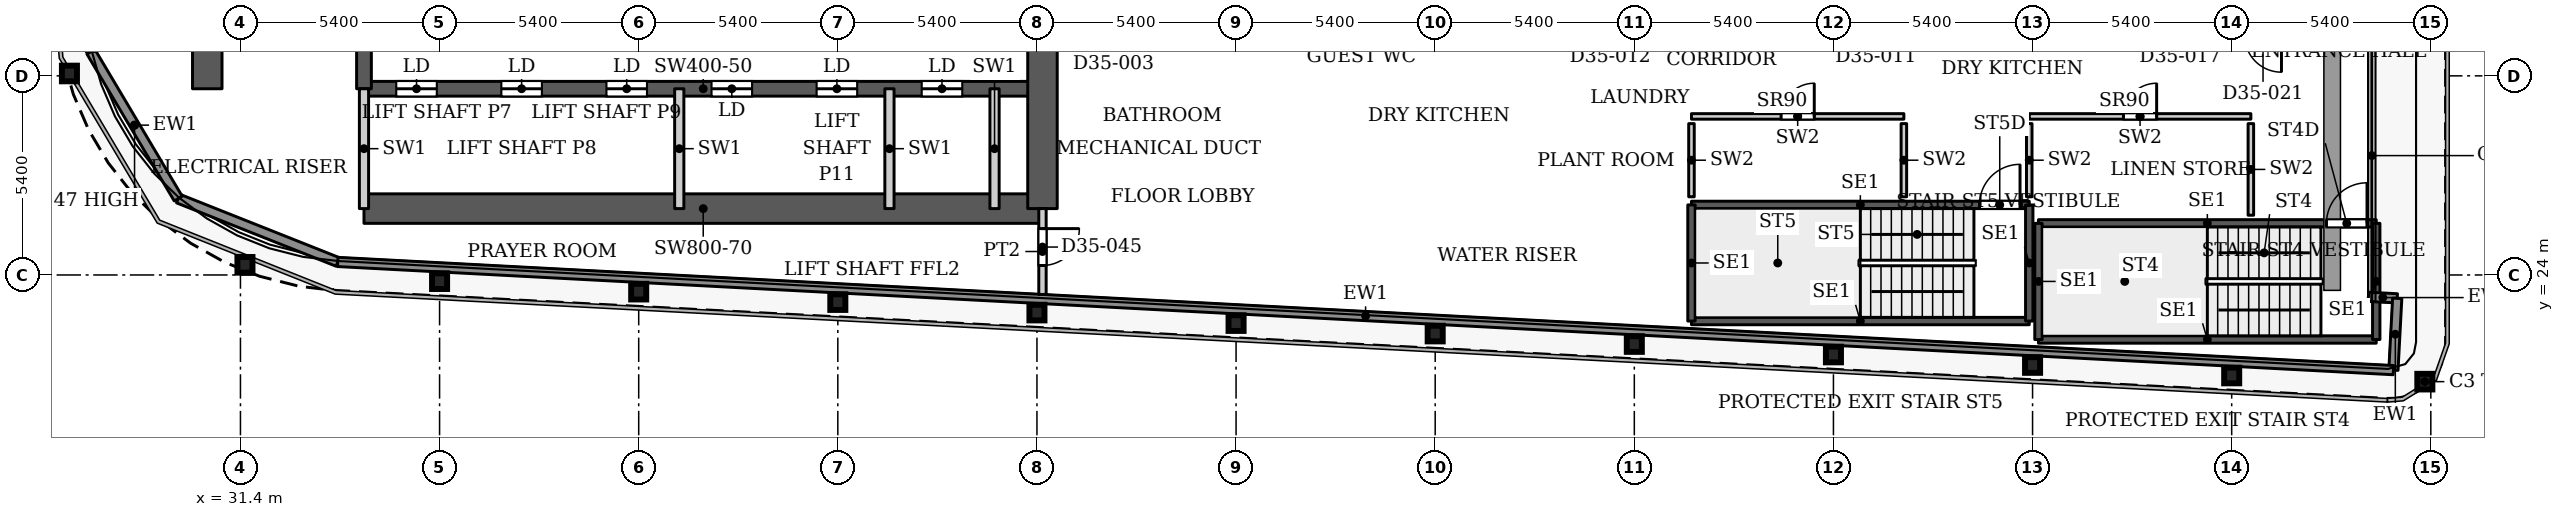
"""IFC4 building model, lengths in metres.
Left out: names, types, materials, properties, quantities, classifications, styles, units other than length and angle.
Written with IfcOpenShell. Run it as: python <this file> out.ifc"""

import sys

from ifc_helpers import new_model, si_unit, direction, frame, frame_2d, origin, origin_2d, place, context, subcontext, project, spatial, rectangle, i_section, extrude, source, transform, mapped, element, fill, save


model = new_model("IFC4")
c1 = context("Model", 3, precision=1e-05, world=origin(), true_north=direction((0.0, 1.0)))
c2 = subcontext(c1, "Body", "Model", "MODEL_VIEW")
j1 = project(units=[si_unit("LENGTHUNIT", "METRE"), si_unit("PLANEANGLEUNIT", "RADIAN")], contexts=[c1])
p1 = place(None, origin())
s1 = spatial("IfcSite", under=j1, at=p1, CompositionType="ELEMENT")
p2 = place(p1, origin())
s2 = spatial("IfcBuilding", under=s1, at=p2, CompositionType="ELEMENT")
p3 = place(p2, frame((0.0, 0.0, 156.5)))
s3 = spatial("IfcBuildingStorey", under=s2, at=p3, CompositionType="ELEMENT", Elevation=156.5)
for number, where, z_axis, x_axis in (
    (1, (90.638, 21.107, 0.0), (0.0, 0.0, 1.0), (1.0, 0.0, 0.0)),
    (2, (85.4, 21.274, 0.0), (0.0, 0.0, 1.0), (1.0, 0.0, 0.0)),
    (3, (80.0, 21.558, 0.0), (0.0, 0.0, 1.0), (1.0, 0.0, 0.0)),
    (4, (74.6, 21.843, 0.0), (0.0, 0.0, 1.0), (1.0, 0.0, 0.0)),
    (5, (69.2, 22.127, 0.0), (0.0, 0.0, 1.0), (1.0, 0.0, 0.0)),
    (6, (63.8, 22.411, 0.0), (0.0, 0.0, 1.0), (1.0, 0.0, 0.0)),
    (7, (58.4, 22.695, 0.0), (0.0, 0.0, 1.0), (1.0, 0.0, 0.0)),
    (8, (53.0, 22.98, 0.0), (0.0, 0.0, 1.0), (1.0, 0.0, 0.0)),
    (9, (47.6, 23.264, 0.0), (0.0, 0.0, 1.0), (1.0, 0.0, 0.0)),
    (10, (42.2, 23.548, 0.0), (0.0, 0.0, 1.0), (1.0, 0.0, 0.0)),
    (11, (36.8, 23.832, 0.0), (0.0, 0.0, 1.0), (1.0, 0.0, 0.0)),
    (12, (31.522, 24.275, 0.0), (0.0, 0.0, 1.0), (1.0, 0.0, 0.0)),
    (13, (26.762, 29.464, 0.0), (0.0, 0.0, 1.0), (1.0, 0.0, 0.0)),
):
    element("IfcColumn", number, at=place(p3, frame(where, z_axis=z_axis, x_axis=x_axis)), inside=s3, PredefinedType="COLUMN", context=c2, shape_type="SweptSolid", body=[
        extrude(i_section(OverallWidth=0.409, OverallDepth=0.425, WebThickness=0.033, FlangeThickness=0.052, FilletRadius=0.013, at=origin_2d()), origin(), (0.0, 0.0, 1.0), 3.9),
    ])
p4 = place(p3, frame((34.75, 25.8, 0.0), z_axis=(0.0, 0.0, 1.0), x_axis=(1.0, 0.0, 0.0)))
e14 = element("IfcWall", 14, at=p4, inside=s3, PredefinedType="SHEAR", context=c2, shape_type="SweptSolid", body=[
    extrude(rectangle(XDim=18.4, YDim=0.8, at=frame_2d((9.2, 0.0))), origin(), (0.0, 0.0, 1.0), 3.9),
])
p5 = place(p3, frame((34.75, 29.05, 0.0), z_axis=(0.0, 0.0, 1.0), x_axis=(1.0, 0.0, 0.0)))
e15 = element("IfcWall", 15, at=p5, inside=s3, PredefinedType="SHEAR", context=c2, shape_type="SweptSolid", body=[
    extrude(rectangle(XDim=18.4, YDim=0.4, at=frame_2d((9.2, 0.0))), origin(), (0.0, 0.0, 1.0), 3.9),
])
p6 = place(p5, frame((0.875, 0.0, 0.0)))
e16 = element("IfcOpeningElement", 16, at=p6, cuts=e15, PredefinedType="OPENING", context=c2, shape_type="SweptSolid", body=[
    extrude(rectangle(XDim=1.1, YDim=2.2, at=frame_2d((0.55, 1.1))), frame((0.0, 0.21, 0.0), z_axis=(0.0, -1.0, 0.0), x_axis=(1.0, 0.0, 0.0)), (0.0, 0.0, 1.0), 0.42),
])
p7 = place(p5, frame((3.725, 0.0, 0.0)))
e17 = element("IfcOpeningElement", 17, at=p7, cuts=e15, PredefinedType="OPENING", context=c2, shape_type="SweptSolid", body=[
    extrude(rectangle(XDim=1.1, YDim=2.2, at=frame_2d((0.55, 1.1))), frame((0.0, 0.21, 0.0), z_axis=(0.0, -1.0, 0.0), x_axis=(1.0, 0.0, 0.0)), (0.0, 0.0, 1.0), 0.42),
])
p8 = place(p5, frame((6.575, 0.0, 0.0)))
e18 = element("IfcOpeningElement", 18, at=p8, cuts=e15, PredefinedType="OPENING", context=c2, shape_type="SweptSolid", body=[
    extrude(rectangle(XDim=1.1, YDim=2.2, at=frame_2d((0.55, 1.1))), frame((0.0, 0.21, 0.0), z_axis=(0.0, -1.0, 0.0), x_axis=(1.0, 0.0, 0.0)), (0.0, 0.0, 1.0), 0.42),
])
p9 = place(p5, frame((9.425, 0.0, 0.0)))
e19 = element("IfcOpeningElement", 19, at=p9, cuts=e15, PredefinedType="OPENING", context=c2, shape_type="SweptSolid", body=[
    extrude(rectangle(XDim=1.1, YDim=2.2, at=frame_2d((0.55, 1.1))), frame((0.0, 0.21, 0.0), z_axis=(0.0, -1.0, 0.0), x_axis=(1.0, 0.0, 0.0)), (0.0, 0.0, 1.0), 0.42),
])
p10 = place(p5, frame((12.275, 0.0, 0.0)))
e20 = element("IfcOpeningElement", 20, at=p10, cuts=e15, PredefinedType="OPENING", context=c2, shape_type="SweptSolid", body=[
    extrude(rectangle(XDim=1.1, YDim=2.2, at=frame_2d((0.55, 1.1))), frame((0.0, 0.21, 0.0), z_axis=(0.0, -1.0, 0.0), x_axis=(1.0, 0.0, 0.0)), (0.0, 0.0, 1.0), 0.42),
])
p11 = place(p5, frame((15.125, 0.0, 0.0)))
e21 = element("IfcOpeningElement", 21, at=p11, cuts=e15, PredefinedType="OPENING", context=c2, shape_type="SweptSolid", body=[
    extrude(rectangle(XDim=1.1, YDim=2.2, at=frame_2d((0.55, 1.1))), frame((0.0, 0.21, 0.0), z_axis=(0.0, -1.0, 0.0), x_axis=(1.0, 0.0, 0.0)), (0.0, 0.0, 1.0), 0.42),
])
p12 = place(p3, frame((34.75, 29.05, 0.0), z_axis=(0.0, 0.0, 1.0), x_axis=(0.0, 1.0, 0.0)))
e22 = element("IfcWall", 22, at=p12, inside=s3, PredefinedType="SHEAR", context=c2, shape_type="SweptSolid", body=[
    extrude(rectangle(XDim=18.45, YDim=0.4, at=frame_2d((9.225, 0.0))), origin(), (0.0, 0.0, 1.0), 3.9),
])
p13 = place(p12, frame((8.025, 0.0, 0.0)))
e23 = element("IfcOpeningElement", 23, at=p13, cuts=e22, PredefinedType="OPENING", context=c2, shape_type="SweptSolid", body=[
    extrude(rectangle(XDim=1.1, YDim=2.2, at=frame_2d((0.55, 1.1))), frame((0.0, 0.21, 0.0), z_axis=(0.0, -1.0, 0.0), x_axis=(1.0, 0.0, 0.0)), (0.0, 0.0, 1.0), 0.42),
])
p14 = place(p12, frame((10.875, 0.0, 0.0)))
e24 = element("IfcOpeningElement", 24, at=p14, cuts=e22, PredefinedType="OPENING", context=c2, shape_type="SweptSolid", body=[
    extrude(rectangle(XDim=1.1, YDim=2.2, at=frame_2d((0.55, 1.1))), frame((0.0, 0.21, 0.0), z_axis=(0.0, -1.0, 0.0), x_axis=(1.0, 0.0, 0.0)), (0.0, 0.0, 1.0), 0.42),
])
p15 = place(p12, frame((13.725, 0.0, 0.0)))
e25 = element("IfcOpeningElement", 25, at=p15, cuts=e22, PredefinedType="OPENING", context=c2, shape_type="SweptSolid", body=[
    extrude(rectangle(XDim=1.1, YDim=2.2, at=frame_2d((0.55, 1.1))), frame((0.0, 0.21, 0.0), z_axis=(0.0, -1.0, 0.0), x_axis=(1.0, 0.0, 0.0)), (0.0, 0.0, 1.0), 0.42),
])
p16 = place(p12, frame((15.95, 0.0, 0.0)))
e26 = element("IfcOpeningElement", 26, at=p16, cuts=e22, PredefinedType="OPENING", context=c2, shape_type="SweptSolid", body=[
    extrude(rectangle(XDim=1.1, YDim=2.2, at=frame_2d((0.55, 1.1))), frame((0.0, 0.21, 0.0), z_axis=(0.0, -1.0, 0.0), x_axis=(1.0, 0.0, 0.0)), (0.0, 0.0, 1.0), 0.42),
])
p17 = place(p3, frame((30.5, 29.05, 0.0), z_axis=(0.0, 0.0, 1.0), x_axis=(0.0, 1.0, 0.0)))
e27 = element("IfcWall", 27, at=p17, inside=s3, PredefinedType="SHEAR", context=c2, shape_type="SweptSolid", body=[
    extrude(rectangle(XDim=18.45, YDim=0.8, at=frame_2d((9.225, 0.0))), origin(), (0.0, 0.0, 1.0), 3.9),
])
p18 = place(p17, frame((6.55, 0.0, 0.0)))
e28 = element("IfcOpeningElement", 28, at=p18, cuts=e27, PredefinedType="OPENING", context=c2, shape_type="SweptSolid", body=[
    extrude(rectangle(XDim=0.9, YDim=2.2, at=frame_2d((0.45, 1.1))), frame((0.0, 0.41, 0.0), z_axis=(0.0, -1.0, 0.0), x_axis=(1.0, 0.0, 0.0)), (0.0, 0.0, 1.0), 0.82),
])
p19 = place(p17, frame((11.025, 0.0, 0.0)))
e29 = element("IfcOpeningElement", 29, at=p19, cuts=e27, PredefinedType="OPENING", context=c2, shape_type="SweptSolid", body=[
    extrude(rectangle(XDim=0.9, YDim=2.2, at=frame_2d((0.45, 1.1))), frame((0.0, 0.41, 0.0), z_axis=(0.0, -1.0, 0.0), x_axis=(1.0, 0.0, 0.0)), (0.0, 0.0, 1.0), 0.82),
])
p20 = place(p3, frame((53.15, 25.8, 0.0), z_axis=(0.0, 0.0, 1.0), x_axis=(0.0, 1.0, 0.0)))
e30 = element("IfcWall", 30, at=p20, inside=s3, PredefinedType="SHEAR", context=c2, shape_type="SweptSolid", body=[
    extrude(rectangle(XDim=10.4, YDim=0.8, at=frame_2d((5.2, 0.0))), origin(), (0.0, 0.0, 1.0), 3.9),
])
p21 = place(p3, frame((34.039, 24.353, 0.0), z_axis=(0.0, 0.0, 1.0), x_axis=(-0.929352825399, 0.369192803184, 0.0)))
e31 = element("IfcWall", 31, at=p21, inside=s3, PredefinedType="SOLIDWALL", context=c2, shape_type="SweptSolid", body=[
    extrude(rectangle(XDim=4.656, YDim=0.25, at=frame_2d((2.328, 0.0))), origin(), (0.0, 0.0, 1.0), 3.75),
])
p22 = place(p3, frame((29.712, 26.072, 0.0), z_axis=(0.0, 0.0, 1.0), x_axis=(-0.511028049012, 0.859564036662, 0.0)))
e32 = element("IfcWall", 32, at=p22, inside=s3, PredefinedType="SOLIDWALL", context=c2, shape_type="SweptSolid", body=[
    extrude(rectangle(XDim=4.634, YDim=0.25, at=frame_2d((2.317, 0.0))), origin(), (0.0, 0.0, 1.0), 3.147),
])
p23 = place(p3, frame((27.344, 30.055, 0.0), z_axis=(0.0, 0.0, 1.0), x_axis=(-0.077571675317, 0.99698677784, 0.0)))
e33 = element("IfcWall", 33, at=p23, inside=s3, PredefinedType="SOLIDWALL", context=c2, shape_type="SweptSolid", body=[
    extrude(rectangle(XDim=1.92, YDim=0.25, at=frame_2d((0.96, 0.0))), origin(), (0.0, 0.0, 1.0), 3.75),
])
p24 = place(p3, frame((89.107, 23.408, 0.0), z_axis=(0.0, 0.0, 1.0), x_axis=(0.998561284263, -0.053622398031, 0.0)))
e34 = element("IfcWall", 34, at=p24, inside=s3, PredefinedType="SOLIDWALL", context=c2, shape_type="SweptSolid", body=[
    extrude(rectangle(XDim=0.783, YDim=0.25, at=frame_2d((0.392, 0.0))), origin(), (0.0, 0.0, 1.0), 3.75),
])
p25 = place(p3, frame((89.889, 23.366, 0.0), z_axis=(0.0, 0.0, 1.0), x_axis=(-0.052841433274, -0.998602915542, 0.0)))
e35 = element("IfcWall", 35, at=p25, inside=s3, PredefinedType="SOLIDWALL", context=c2, shape_type="SweptSolid", body=[
    extrude(rectangle(XDim=1.95, YDim=0.25, at=frame_2d((0.975, 0.0))), origin(), (0.0, 0.0, 1.0), 3.75),
])
p26 = place(p3, frame((89.786, 21.419, 0.0), z_axis=(0.0, 0.0, 1.0), x_axis=(-0.998617793089, 0.052559521752, 0.0)))
e36 = element("IfcWall", 36, at=p26, inside=s3, PredefinedType="SOLIDWALL", context=c2, shape_type="SweptSolid", body=[
    extrude(rectangle(XDim=55.824, YDim=0.25, at=frame_2d((27.912, 0.0))), origin(), (0.0, 0.0, 1.0), 3.75),
])
p27 = place(p3, frame((80.16, 22.25, 0.0), z_axis=(0.0, 0.0, 1.0), x_axis=(1.0, 0.0, 0.0)))
e37 = element("IfcWall", 37, at=p27, inside=s3, PredefinedType="SHEAR", context=c2, shape_type="SweptSolid", body=[
    extrude(rectangle(XDim=9.16, YDim=0.2, at=frame_2d((4.58, 0.0))), origin(), (0.0, 0.0, 1.0), 3.9),
])
p28 = place(p3, frame((80.16, 25.4, 0.0), z_axis=(0.0, 0.0, 1.0), x_axis=(1.0, 0.0, 0.0)))
e38 = element("IfcWall", 38, at=p28, inside=s3, PredefinedType="SHEAR", context=c2, shape_type="SweptSolid", body=[
    extrude(rectangle(XDim=9.16, YDim=0.2, at=frame_2d((4.58, 0.0))), origin(), (0.0, 0.0, 1.0), 3.9),
])
p29 = place(p28, frame((7.81, 0.0, 0.0)))
e39 = element("IfcOpeningElement", 39, at=p29, cuts=e38, PredefinedType="OPENING", context=c2, shape_type="SweptSolid", body=[
    extrude(rectangle(XDim=1.1, YDim=2.2, at=frame_2d((0.55, 1.1))), frame((0.0, 0.11, 0.0), z_axis=(0.0, -1.0, 0.0), x_axis=(1.0, 0.0, 0.0)), (0.0, 0.0, 1.0), 0.22),
])
for number, where, z_axis, x_axis in (
    (40, (80.16, 22.25, 0.0), (0.0, 0.0, 1.0), (0.0, 1.0, 0.0)),
    (41, (89.32, 22.25, 0.0), (0.0, 0.0, 1.0), (0.0, 1.0, 0.0)),
):
    element("IfcWall", number, at=place(p3, frame(where, z_axis=z_axis, x_axis=x_axis)), inside=s3, PredefinedType="SHEAR", context=c2, shape_type="SweptSolid", body=[
        extrude(rectangle(XDim=3.15, YDim=0.2, at=frame_2d((1.575, 0.0))), origin(), (0.0, 0.0, 1.0), 3.9),
    ])
p30 = place(p3, frame((70.75, 22.75, 0.0), z_axis=(0.0, 0.0, 1.0), x_axis=(1.0, 0.0, 0.0)))
e42 = element("IfcWall", 42, at=p30, inside=s3, PredefinedType="SHEAR", context=c2, shape_type="SweptSolid", body=[
    extrude(rectangle(XDim=9.16, YDim=0.2, at=frame_2d((4.58, 0.0))), origin(), (0.0, 0.0, 1.0), 3.9),
])
p31 = place(p3, frame((70.75, 25.9, 0.0), z_axis=(0.0, 0.0, 1.0), x_axis=(1.0, 0.0, 0.0)))
e43 = element("IfcWall", 43, at=p31, inside=s3, PredefinedType="SHEAR", context=c2, shape_type="SweptSolid", body=[
    extrude(rectangle(XDim=9.16, YDim=0.2, at=frame_2d((4.58, 0.0))), origin(), (0.0, 0.0, 1.0), 3.9),
])
p32 = place(p31, frame((7.81, 0.0, 0.0)))
e44 = element("IfcOpeningElement", 44, at=p32, cuts=e43, PredefinedType="OPENING", context=c2, shape_type="SweptSolid", body=[
    extrude(rectangle(XDim=1.1, YDim=2.2, at=frame_2d((0.55, 1.1))), frame((0.0, 0.11, 0.0), z_axis=(0.0, -1.0, 0.0), x_axis=(1.0, 0.0, 0.0)), (0.0, 0.0, 1.0), 0.22),
])
for number, where, z_axis, x_axis in (
    (45, (70.75, 22.75, 0.0), (0.0, 0.0, 1.0), (0.0, 1.0, 0.0)),
    (46, (79.91, 22.75, 0.0), (0.0, 0.0, 1.0), (0.0, 1.0, 0.0)),
):
    element("IfcWall", number, at=place(p3, frame(where, z_axis=z_axis, x_axis=x_axis)), inside=s3, PredefinedType="SHEAR", context=c2, shape_type="SweptSolid", body=[
        extrude(rectangle(XDim=3.15, YDim=0.2, at=frame_2d((1.575, 0.0))), origin(), (0.0, 0.0, 1.0), 3.9),
    ])
for number, where, z_axis, x_axis in (
    (47, (34.75, 25.8, 0.0), (0.0, 0.0, 1.0), (0.0, 1.0, 0.0)),
    (48, (43.3, 25.8, 0.0), (0.0, 0.0, 1.0), (0.0, 1.0, 0.0)),
    (49, (49.0, 25.8, 0.0), (0.0, 0.0, 1.0), (0.0, 1.0, 0.0)),
    (50, (51.85, 25.8, 0.0), (0.0, 0.0, 1.0), (0.0, 1.0, 0.0)),
):
    element("IfcWall", number, at=place(p3, frame(where, z_axis=z_axis, x_axis=x_axis)), inside=s3, PredefinedType="PARTITIONING", context=c2, shape_type="SweptSolid", body=[
        extrude(rectangle(XDim=3.25, YDim=0.25, at=frame_2d((1.625, 0.0))), origin(), (0.0, 0.0, 1.0), 3.9),
    ])
p33 = place(p3, frame((70.75, 28.3, 0.0), z_axis=(0.0, 0.0, 1.0), x_axis=(1.0, 0.0, 0.0)))
e51 = element("IfcWall", 51, at=p33, inside=s3, PredefinedType="PARTITIONING", context=c2, shape_type="SweptSolid", body=[
    extrude(rectangle(XDim=5.76, YDim=0.15, at=frame_2d((2.88, 0.0))), origin(), (0.0, 0.0, 1.0), 3.9),
])
p34 = place(p33, frame((2.43, 0.0, 0.0)))
e52 = element("IfcOpeningElement", 52, at=p34, cuts=e51, PredefinedType="OPENING", context=c2, shape_type="SweptSolid", body=[
    extrude(rectangle(XDim=0.9, YDim=2.2, at=frame_2d((0.45, 1.1))), frame((0.0, 0.085, 0.0), z_axis=(0.0, -1.0, 0.0), x_axis=(1.0, 0.0, 0.0)), (0.0, 0.0, 1.0), 0.17),
])
for number, where, z_axis, x_axis in (
    (53, (70.75, 26.12, 0.0), (0.0, 0.0, 1.0), (0.0, 1.0, 0.0)),
    (54, (76.51, 26.12, 0.0), (0.0, 0.0, 1.0), (0.0, 1.0, 0.0)),
):
    element("IfcWall", number, at=place(p3, frame(where, z_axis=z_axis, x_axis=x_axis)), inside=s3, PredefinedType="PARTITIONING", context=c2, shape_type="SweptSolid", body=[
        extrude(rectangle(XDim=1.985, YDim=0.15, at=frame_2d((0.992, 0.0))), origin(), (0.0, 0.0, 1.0), 3.9),
    ])
p35 = place(p3, frame((79.91, 28.3, 0.0), z_axis=(0.0, 0.0, 1.0), x_axis=(1.0, 0.0, 0.0)))
e55 = element("IfcWall", 55, at=p35, inside=s3, PredefinedType="PARTITIONING", context=c2, shape_type="SweptSolid", body=[
    extrude(rectangle(XDim=6.01, YDim=0.15, at=frame_2d((3.005, 0.0))), origin(), (0.0, 0.0, 1.0), 3.9),
])
p36 = place(p35, frame((2.555, 0.0, 0.0)))
e56 = element("IfcOpeningElement", 56, at=p36, cuts=e55, PredefinedType="OPENING", context=c2, shape_type="SweptSolid", body=[
    extrude(rectangle(XDim=0.9, YDim=2.2, at=frame_2d((0.45, 1.1))), frame((0.0, 0.085, 0.0), z_axis=(0.0, -1.0, 0.0), x_axis=(1.0, 0.0, 0.0)), (0.0, 0.0, 1.0), 0.17),
])
p37 = place(p3, frame((79.91, 26.12, 0.0), z_axis=(0.0, 0.0, 1.0), x_axis=(0.0, 1.0, 0.0)))
e57 = element("IfcWall", 57, at=p37, inside=s3, PredefinedType="PARTITIONING", context=c2, shape_type="SweptSolid", body=[
    extrude(rectangle(XDim=1.985, YDim=0.15, at=frame_2d((0.992, 0.0))), origin(), (0.0, 0.0, 1.0), 3.9),
])
p38 = place(p3, frame((85.92, 25.62, 0.0), z_axis=(0.0, 0.0, 1.0), x_axis=(0.0, 1.0, 0.0)))
e58 = element("IfcWall", 58, at=p38, inside=s3, PredefinedType="PARTITIONING", context=c2, shape_type="SweptSolid", body=[
    extrude(rectangle(XDim=2.485, YDim=0.15, at=frame_2d((1.242, 0.0))), origin(), (0.0, 0.0, 1.0), 3.9),
])
p39 = place(p3, frame((53.15, 23.472, 0.0), z_axis=(0.0, 0.0, 1.0), x_axis=(0.0, 1.0, 0.0)))
e59 = element("IfcWall", 59, at=p39, inside=s3, PredefinedType="PARTITIONING", context=c2, shape_type="SweptSolid", body=[
    extrude(rectangle(XDim=2.328, YDim=0.2, at=frame_2d((1.164, 0.0))), origin(), (0.0, 0.0, 1.0), 3.6),
])
p40 = place(p39, frame((0.785, 0.0, 0.0)))
e60 = element("IfcOpeningElement", 60, at=p40, cuts=e59, PredefinedType="OPENING", context=c2, shape_type="SweptSolid", body=[
    extrude(rectangle(XDim=1.0, YDim=2.1, at=frame_2d((0.5, 1.05))), frame((0.0, 0.11, 0.0), z_axis=(0.0, -1.0, 0.0), x_axis=(1.0, 0.0, 0.0)), (0.0, 0.0, 1.0), 0.22),
])
m1 = source(origin(), c2, "Body", "SweptSolid", [
    extrude(rectangle(XDim=1.1, YDim=2.2, at=frame_2d((0.55, 1.1))), frame((0.0, 0.025, 0.0), z_axis=(0.0, -1.0, 0.0), x_axis=(1.0, 0.0, 0.0)), (0.0, 0.0, 1.0), 0.05),
])
p41 = place(p6, origin())
e61 = element("IfcDoor", 61, at=p41, inside=s3, OperationType="SLIDING_TO_LEFT", PredefinedType="DOOR", context=c2, shape_type="MappedRepresentation", body=[
    mapped(m1, transform((0.0, 0.0, 0.0), x_axis=(1.0, 0.0, 0.0), y_axis=(0.0, 1.0, 0.0), z_axis=(0.0, 0.0, 1.0), scale=1.0)),
])
fill(e16, e61)
p42 = place(p7, origin())
e62 = element("IfcDoor", 62, at=p42, inside=s3, OperationType="SLIDING_TO_LEFT", PredefinedType="DOOR", context=c2, shape_type="MappedRepresentation", body=[
    mapped(m1, transform((0.0, 0.0, 0.0), x_axis=(1.0, 0.0, 0.0), y_axis=(0.0, 1.0, 0.0), z_axis=(0.0, 0.0, 1.0), scale=1.0)),
])
fill(e17, e62)
p43 = place(p8, origin())
e63 = element("IfcDoor", 63, at=p43, inside=s3, OperationType="SLIDING_TO_LEFT", PredefinedType="DOOR", context=c2, shape_type="MappedRepresentation", body=[
    mapped(m1, transform((0.0, 0.0, 0.0), x_axis=(1.0, 0.0, 0.0), y_axis=(0.0, 1.0, 0.0), z_axis=(0.0, 0.0, 1.0), scale=1.0)),
])
fill(e18, e63)
p44 = place(p9, origin())
e64 = element("IfcDoor", 64, at=p44, inside=s3, OperationType="SLIDING_TO_LEFT", PredefinedType="DOOR", context=c2, shape_type="MappedRepresentation", body=[
    mapped(m1, transform((0.0, 0.0, 0.0), x_axis=(1.0, 0.0, 0.0), y_axis=(0.0, 1.0, 0.0), z_axis=(0.0, 0.0, 1.0), scale=1.0)),
])
fill(e19, e64)
p45 = place(p10, origin())
e65 = element("IfcDoor", 65, at=p45, inside=s3, OperationType="SLIDING_TO_LEFT", PredefinedType="DOOR", context=c2, shape_type="MappedRepresentation", body=[
    mapped(m1, transform((0.0, 0.0, 0.0), x_axis=(1.0, 0.0, 0.0), y_axis=(0.0, 1.0, 0.0), z_axis=(0.0, 0.0, 1.0), scale=1.0)),
])
fill(e20, e65)
p46 = place(p11, origin())
e66 = element("IfcDoor", 66, at=p46, inside=s3, OperationType="SLIDING_TO_LEFT", PredefinedType="DOOR", context=c2, shape_type="MappedRepresentation", body=[
    mapped(m1, transform((0.0, 0.0, 0.0), x_axis=(1.0, 0.0, 0.0), y_axis=(0.0, 1.0, 0.0), z_axis=(0.0, 0.0, 1.0), scale=1.0)),
])
fill(e21, e66)
m2 = source(origin(), c2, "Body", "SweptSolid", [
    extrude(rectangle(XDim=0.9, YDim=2.2, at=frame_2d((0.45, 1.1))), frame((0.0, 0.025, 0.0), z_axis=(0.0, -1.0, 0.0), x_axis=(1.0, 0.0, 0.0)), (0.0, 0.0, 1.0), 0.05),
])
p47 = place(p34, origin())
e67 = element("IfcDoor", 67, at=p47, inside=s3, OperationType="SINGLE_SWING_LEFT", PredefinedType="DOOR", context=c2, shape_type="MappedRepresentation", body=[
    mapped(m2, transform((0.0, 0.0, 0.0), x_axis=(1.0, 0.0, 0.0), y_axis=(0.0, 1.0, 0.0), z_axis=(0.0, 0.0, 1.0), scale=1.0)),
])
fill(e52, e67)
p48 = place(p36, origin())
e68 = element("IfcDoor", 68, at=p48, inside=s3, OperationType="SINGLE_SWING_LEFT", PredefinedType="DOOR", context=c2, shape_type="MappedRepresentation", body=[
    mapped(m2, transform((0.0, 0.0, 0.0), x_axis=(1.0, 0.0, 0.0), y_axis=(0.0, 1.0, 0.0), z_axis=(0.0, 0.0, 1.0), scale=1.0)),
])
fill(e56, e68)
m3 = source(origin(), c2, "Body", "SweptSolid", [
    extrude(rectangle(XDim=1.1, YDim=2.2, at=frame_2d((0.55, 1.1))), frame((0.0, 0.025, 0.0), z_axis=(0.0, -1.0, 0.0), x_axis=(1.0, 0.0, 0.0)), (0.0, 0.0, 1.0), 0.05),
])
p49 = place(p29, origin())
e69 = element("IfcDoor", 69, at=p49, inside=s3, OperationType="SINGLE_SWING_LEFT", PredefinedType="DOOR", context=c2, shape_type="MappedRepresentation", body=[
    mapped(m3, transform((0.0, 0.0, 0.0), x_axis=(1.0, 0.0, 0.0), y_axis=(0.0, 1.0, 0.0), z_axis=(0.0, 0.0, 1.0), scale=1.0)),
])
fill(e39, e69)
p50 = place(p32, origin())
e70 = element("IfcDoor", 70, at=p50, inside=s3, OperationType="SINGLE_SWING_LEFT", PredefinedType="DOOR", context=c2, shape_type="MappedRepresentation", body=[
    mapped(m3, transform((0.0, 0.0, 0.0), x_axis=(1.0, 0.0, 0.0), y_axis=(0.0, 1.0, 0.0), z_axis=(0.0, 0.0, 1.0), scale=1.0)),
])
fill(e44, e70)
m4 = source(origin(), c2, "Body", "SweptSolid", [
    extrude(rectangle(XDim=1.0, YDim=2.1, at=frame_2d((0.5, 1.05))), frame((0.0, 0.025, 0.0), z_axis=(0.0, -1.0, 0.0), x_axis=(1.0, 0.0, 0.0)), (0.0, 0.0, 1.0), 0.05),
])
p51 = place(p40, origin())
e71 = element("IfcDoor", 71, at=p51, inside=s3, OperationType="SINGLE_SWING_RIGHT", PredefinedType="DOOR", context=c2, shape_type="MappedRepresentation", body=[
    mapped(m4, transform((0.0, 0.0, 0.0), x_axis=(1.0, 0.0, 0.0), y_axis=(0.0, 1.0, 0.0), z_axis=(0.0, 0.0, 1.0), scale=1.0)),
])
fill(e60, e71)
save(model, sys.argv[1])
